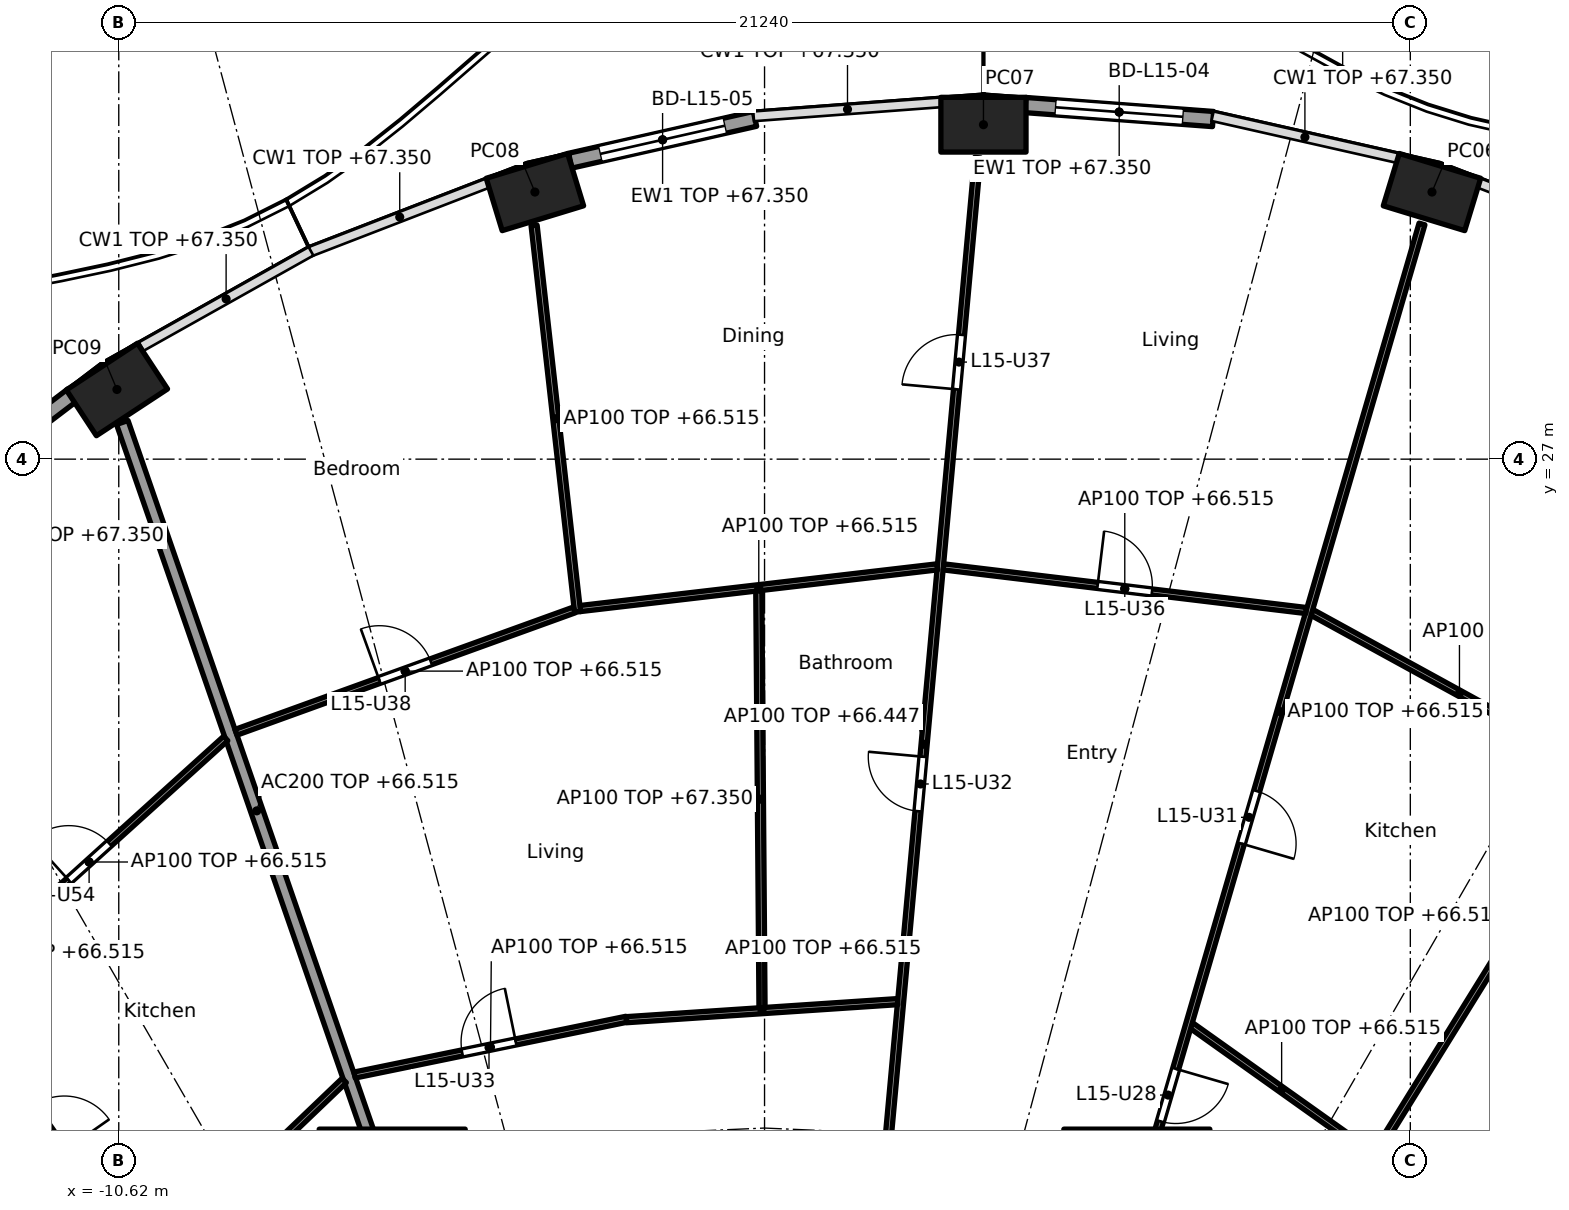
"""IFC4 building model, lengths in metres.
Left out: names, types, materials, properties, quantities, classifications, styles, units other than length and angle.
Written with IfcOpenShell. Run it as: python <this file> out.ifc"""

import sys

from ifc_helpers import new_model, si_unit, direction, frame, frame_2d, origin, origin_2d, place, context, subcontext, project, spatial, rectangle, hollow_rectangle, extrude, element, fill, save


model = new_model("IFC4")
c1 = context("Model", 3, precision=1e-05, world=origin(), true_north=direction((0.0, 1.0)))
c2 = subcontext(c1, "Body", "Model", "MODEL_VIEW")
j1 = project(units=[si_unit("LENGTHUNIT", "METRE"), si_unit("PLANEANGLEUNIT", "RADIAN")], contexts=[c1])
p1 = place(None, origin())
s1 = spatial("IfcSite", under=j1, at=p1, CompositionType="ELEMENT")
p2 = place(p1, origin())
s2 = spatial("IfcBuilding", under=s1, at=p2, CompositionType="ELEMENT")
p3 = place(p2, frame((0.0, 0.0, 64.0)))
s3 = spatial("IfcBuildingStorey", under=s2, at=p3, CompositionType="ELEMENT", Elevation=64.0)
for number, where, z_axis, x_axis in (
    (1, (10.976, 31.393, 0.0), (0.0, 0.0, 1.0), (-0.957, 0.292, 0.0)),
    (2, (3.6, 32.5, 0.0), (0.0, 0.0, 1.0), (-1.0, 0.0, 0.0)),
    (3, (-3.776, 31.393, 0.0), (0.0, 0.0, 1.0), (-0.957, -0.292, 0.0)),
    (4, (-10.65, 28.146, 0.0), (0.0, 0.0, 1.0), (-0.836, -0.549, 0.0)),
):
    element("IfcColumn", number, at=place(p3, frame(where, z_axis=z_axis, x_axis=x_axis)), inside=s3, PredefinedType="COLUMN", context=c2, shape_type="SweptSolid", body=[
        extrude(hollow_rectangle(XDim=1.4, YDim=0.9, WallThickness=0.05, at=origin_2d()), origin(), (0.0, 0.0, 1.0), 3.7),
    ])
for number, where, z_axis, x_axis in (
    (5, (6.123, 14.782, 0.0), (0.0, 0.0, 1.0), (1.0, 0.0, 0.0)),
    (6, (-6.123, 14.782, 0.0), (0.0, 0.0, 1.0), (1.0, 0.0, 0.0)),
):
    element("IfcColumn", number, at=place(p3, frame(where, z_axis=z_axis, x_axis=x_axis)), inside=s3, PredefinedType="COLUMN", context=c2, shape_type="SweptSolid", body=[
        extrude(rectangle(XDim=2.4, YDim=2.4, at=origin_2d()), origin(), (0.0, 0.0, 1.0), 3.7),
    ])
p4 = place(p3, frame((4.289, 32.823, 0.0), z_axis=(0.0, 0.0, 1.0), x_axis=(0.997230834878, -0.074368420505, 0.0)))
e7 = element("IfcWall", 7, at=p4, inside=s3, PredefinedType="SOLIDWALL", context=c2, shape_type="SweptSolid", body=[
    extrude(rectangle(XDim=3.096, YDim=0.25, at=frame_2d((1.548, 0.0))), origin(), (0.0, 0.0, 1.0), 3.35),
])
p5 = place(p4, frame((0.498, 0.0, 0.0)))
e8 = element("IfcOpeningElement", 8, at=p5, cuts=e7, PredefinedType="OPENING", context=c2, shape_type="SweptSolid", body=[
    extrude(rectangle(XDim=2.1, YDim=2.4, at=frame_2d((1.05, 1.2))), frame((0.0, 0.135, 0.0), z_axis=(0.0, -1.0, 0.0), x_axis=(1.0, 0.0, 0.0)), (0.0, 0.0, 1.0), 0.27),
])
p6 = place(p3, frame((-3.195, 31.908, 0.0), z_axis=(0.0, 0.0, 1.0), x_axis=(0.975331134677, 0.220746863466, 0.0)))
e9 = element("IfcWall", 9, at=p6, inside=s3, PredefinedType="SOLIDWALL", context=c2, shape_type="SweptSolid", body=[
    extrude(rectangle(XDim=3.115, YDim=0.25, at=frame_2d((1.557, 0.0))), origin(), (0.0, 0.0, 1.0), 3.35),
])
p7 = place(p6, frame((0.507, 0.0, 0.0)))
e10 = element("IfcOpeningElement", 10, at=p7, cuts=e9, PredefinedType="OPENING", context=c2, shape_type="SweptSolid", body=[
    extrude(rectangle(XDim=2.1, YDim=2.4, at=frame_2d((1.05, 1.2))), frame((0.0, 0.135, 0.0), z_axis=(0.0, -1.0, 0.0), x_axis=(1.0, 0.0, 0.0)), (0.0, 0.0, 1.0), 0.27),
])
p8 = place(p3, frame((-13.979, 26.081, 0.0), z_axis=(0.0, 0.0, 1.0), x_axis=(0.796022293214, 0.605267303517, 0.0)))
e11 = element("IfcWall", 11, at=p8, inside=s3, PredefinedType="SOLIDWALL", context=c2, shape_type="SweptSolid", body=[
    extrude(rectangle(XDim=3.262, YDim=0.25, at=frame_2d((1.631, 0.0))), origin(), (0.0, 0.0, 1.0), 3.35),
])
p9 = place(p8, frame((0.581, 0.0, 0.0)))
e12 = element("IfcOpeningElement", 12, at=p9, cuts=e11, PredefinedType="OPENING", context=c2, shape_type="SweptSolid", body=[
    extrude(rectangle(XDim=2.1, YDim=2.4, at=frame_2d((1.05, 1.2))), frame((0.0, 0.135, 0.0), z_axis=(0.0, -1.0, 0.0), x_axis=(1.0, 0.0, 0.0)), (0.0, 0.0, 1.0), 0.27),
])
p10 = place(p3, frame((-6.139, 14.829, 0.0), z_axis=(0.0, 0.0, 1.0), x_axis=(-0.327178799566, 0.944962450637, 0.0)))
e13 = element("IfcWall", 13, at=p10, inside=s3, PredefinedType="PARTITIONING", context=c2, shape_type="SweptSolid", body=[
    extrude(rectangle(XDim=13.517, YDim=0.2, at=frame_2d((6.759, 0.0))), origin(), (0.0, 0.0, 1.0), 2.515),
])
p11 = place(p3, frame((10.003, 15.503, 0.0), z_axis=(0.0, 0.0, 1.0), x_axis=(0.52645953022, 0.850200189979, 0.0)))
e14 = element("IfcWall", 14, at=p11, inside=s3, PredefinedType="PARTITIONING", context=c2, shape_type="SweptSolid", body=[
    extrude(rectangle(XDim=7.45, YDim=0.1, at=frame_2d((3.725, 0.0))), origin(), (0.0, 0.0, 1.0), 2.515),
])
p12 = place(p3, frame((9.989, 15.574, 0.0), z_axis=(0.0, 0.0, 1.0), x_axis=(-0.81494477814, 0.57953861699, 0.0)))
e15 = element("IfcWall", 15, at=p12, inside=s3, PredefinedType="PARTITIONING", context=c2, shape_type="SweptSolid", body=[
    extrude(rectangle(XDim=3.644, YDim=0.1, at=frame_2d((1.822, 0.0))), origin(), (0.0, 0.0, 1.0), 2.515),
])
p13 = place(p3, frame((13.855, 21.818, 0.0), z_axis=(0.0, 0.0, 1.0), x_axis=(-0.876794415294, 0.480865421203, 0.0)))
e16 = element("IfcWall", 16, at=p13, inside=s3, PredefinedType="PARTITIONING", context=c2, shape_type="SweptSolid", body=[
    extrude(rectangle(XDim=5.536, YDim=0.1, at=frame_2d((2.768, 0.0))), origin(), (0.0, 0.0, 1.0), 2.515),
])
p14 = place(p3, frame((6.137, 14.83, 0.0), z_axis=(0.0, 0.0, 1.0), x_axis=(0.27985745069, 0.960041565399, 0.0)))
e17 = element("IfcWall", 17, at=p14, inside=s3, PredefinedType="PARTITIONING", context=c2, shape_type="SweptSolid", body=[
    extrude(rectangle(XDim=16.705, YDim=0.1, at=frame_2d((8.353, 0.0))), origin(), (0.0, 0.0, 1.0), 2.515),
])
p15 = place(p14, frame((1.334, 0.0, 0.0)))
e18 = element("IfcOpeningElement", 18, at=p15, cuts=e17, PredefinedType="OPENING", context=c2, shape_type="SweptSolid", body=[
    extrude(rectangle(XDim=0.9, YDim=2.1, at=frame_2d((0.45, 1.05))), frame((0.0, 0.06, 0.0), z_axis=(0.0, -1.0, 0.0), x_axis=(1.0, 0.0, 0.0)), (0.0, 0.0, 1.0), 0.12),
])
p16 = place(p14, frame((6.091, 0.0, 0.0)))
e19 = element("IfcOpeningElement", 19, at=p16, cuts=e17, PredefinedType="OPENING", context=c2, shape_type="SweptSolid", body=[
    extrude(rectangle(XDim=0.9, YDim=2.1, at=frame_2d((0.45, 1.05))), frame((0.0, 0.06, 0.0), z_axis=(0.0, -1.0, 0.0), x_axis=(1.0, 0.0, 0.0)), (0.0, 0.0, 1.0), 0.12),
])
p17 = place(p3, frame((8.907, 24.51, 0.0), z_axis=(0.0, 0.0, 1.0), x_axis=(-0.992836798252, 0.119478416615, 0.0)))
e20 = element("IfcWall", 20, at=p17, inside=s3, PredefinedType="PARTITIONING", context=c2, shape_type="SweptSolid", body=[
    extrude(rectangle(XDim=6.01, YDim=0.1, at=frame_2d((3.005, 0.0))), origin(), (0.0, 0.0, 1.0), 2.515),
])
p18 = place(p17, frame((2.555, 0.0, 0.0)))
e21 = element("IfcOpeningElement", 21, at=p18, cuts=e20, PredefinedType="OPENING", context=c2, shape_type="SweptSolid", body=[
    extrude(rectangle(XDim=0.9, YDim=2.1, at=frame_2d((0.45, 1.05))), frame((0.0, 0.06, 0.0), z_axis=(0.0, -1.0, 0.0), x_axis=(1.0, 0.0, 0.0)), (0.0, 0.0, 1.0), 0.12),
])
p19 = place(p3, frame((1.744, 12.664, 0.0), z_axis=(0.0, 0.0, 1.0), x_axis=(0.090893639596, 0.995860605849, 0.0)))
e22 = element("IfcWall", 22, at=p19, inside=s3, PredefinedType="PARTITIONING", context=c2, shape_type="SweptSolid", body=[
    extrude(rectangle(XDim=19.374, YDim=0.1, at=frame_2d((9.687, 0.0))), origin(), (0.0, 0.0, 1.0), 2.447),
])
p20 = place(p19, frame((2.27, 0.0, 0.0)))
e23 = element("IfcOpeningElement", 23, at=p20, cuts=e22, PredefinedType="OPENING", context=c2, shape_type="SweptSolid", body=[
    extrude(rectangle(XDim=0.9, YDim=2.1, at=frame_2d((0.45, 1.05))), frame((0.0, 0.06, 0.0), z_axis=(0.0, -1.0, 0.0), x_axis=(1.0, 0.0, 0.0)), (0.0, 0.0, 1.0), 0.12),
])
p21 = place(p19, frame((8.582, 0.0, 0.0)))
e24 = element("IfcOpeningElement", 24, at=p21, cuts=e22, PredefinedType="OPENING", context=c2, shape_type="SweptSolid", body=[
    extrude(rectangle(XDim=0.9, YDim=2.1, at=frame_2d((0.45, 1.05))), frame((0.0, 0.06, 0.0), z_axis=(0.0, -1.0, 0.0), x_axis=(1.0, 0.0, 0.0)), (0.0, 0.0, 1.0), 0.12),
])
p22 = place(p19, frame((15.548, 0.0, 0.0)))
e25 = element("IfcOpeningElement", 25, at=p22, cuts=e22, PredefinedType="OPENING", context=c2, shape_type="SweptSolid", body=[
    extrude(rectangle(XDim=0.9, YDim=2.1, at=frame_2d((0.45, 1.05))), frame((0.0, 0.06, 0.0), z_axis=(0.0, -1.0, 0.0), x_axis=(1.0, 0.0, 0.0)), (0.0, 0.0, 1.0), 0.12),
])
p23 = place(p3, frame((2.188, 18.079, 0.0), z_axis=(0.0, 0.0, 1.0), x_axis=(-0.997791437766, -0.066424744789, 0.0)))
e26 = element("IfcWall", 26, at=p23, inside=s3, PredefinedType="PARTITIONING", context=c2, shape_type="SweptSolid", body=[
    extrude(rectangle(XDim=4.469, YDim=0.1, at=frame_2d((2.235, 0.0))), origin(), (0.0, 0.0, 1.0), 2.515),
])
p24 = place(p3, frame((2.842, 25.229, 0.0), z_axis=(0.0, 0.0, 1.0), x_axis=(-0.993255612046, -0.115945198862, 0.0)))
e27 = element("IfcWall", 27, at=p24, inside=s3, PredefinedType="PARTITIONING", context=c2, shape_type="SweptSolid", body=[
    extrude(rectangle(XDim=5.913, YDim=0.1, at=frame_2d((2.956, 0.0))), origin(), (0.0, 0.0, 1.0), 2.515),
])
p25 = place(p3, frame((-0.042, 17.98, 0.0), z_axis=(0.0, 0.0, 1.0), x_axis=(-0.007692080119, 0.999970415514, 0.0)))
e28 = element("IfcWall", 28, at=p25, inside=s3, PredefinedType="PARTITIONING", context=c2, shape_type="SweptSolid", body=[
    extrude(rectangle(XDim=6.856, YDim=0.1, at=frame_2d((3.428, 0.0))), origin(), (0.0, 0.0, 1.0), 3.35),
])
p26 = place(p3, frame((-2.272, 17.789, 0.0), z_axis=(0.0, 0.0, 1.0), x_axis=(-0.979595137747, -0.200981009307, 0.0)))
e29 = element("IfcWall", 29, at=p26, inside=s3, PredefinedType="PARTITIONING", context=c2, shape_type="SweptSolid", body=[
    extrude(rectangle(XDim=4.562, YDim=0.1, at=frame_2d((2.281, 0.0))), origin(), (0.0, 0.0, 1.0), 2.515),
])
p27 = place(p26, frame((1.856, 0.0, 0.0)))
e30 = element("IfcOpeningElement", 30, at=p27, cuts=e29, PredefinedType="OPENING", context=c2, shape_type="SweptSolid", body=[
    extrude(rectangle(XDim=0.9, YDim=2.1, at=frame_2d((0.45, 1.05))), frame((0.0, 0.06, 0.0), z_axis=(0.0, -1.0, 0.0), x_axis=(1.0, 0.0, 0.0)), (0.0, 0.0, 1.0), 0.12),
])
p28 = place(p3, frame((-3.075, 24.488, 0.0), z_axis=(0.0, 0.0, 1.0), x_axis=(-0.111705235978, 0.993741384997, 0.0)))
e31 = element("IfcWall", 31, at=p28, inside=s3, PredefinedType="PARTITIONING", context=c2, shape_type="SweptSolid", body=[
    extrude(rectangle(XDim=6.395, YDim=0.1, at=frame_2d((3.198, 0.0))), origin(), (0.0, 0.0, 1.0), 2.515),
])
p29 = place(p3, frame((-3.128, 24.521, 0.0), z_axis=(0.0, 0.0, 1.0), x_axis=(-0.940401494588, -0.340066212636, 0.0)))
e32 = element("IfcWall", 32, at=p29, inside=s3, PredefinedType="PARTITIONING", context=c2, shape_type="SweptSolid", body=[
    extrude(rectangle(XDim=5.917, YDim=0.1, at=frame_2d((2.958, 0.0))), origin(), (0.0, 0.0, 1.0), 2.515),
])
p30 = place(p29, frame((2.509, 0.0, 0.0)))
e33 = element("IfcOpeningElement", 33, at=p30, cuts=e32, PredefinedType="OPENING", context=c2, shape_type="SweptSolid", body=[
    extrude(rectangle(XDim=0.9, YDim=2.1, at=frame_2d((0.45, 1.05))), frame((0.0, 0.06, 0.0), z_axis=(0.0, -1.0, 0.0), x_axis=(1.0, 0.0, 0.0)), (0.0, 0.0, 1.0), 0.12),
])
p31 = place(p3, frame((-6.912, 16.782, 0.0), z_axis=(0.0, 0.0, 1.0), x_axis=(-0.722775679202, -0.691082713975, 0.0)))
e34 = element("IfcWall", 34, at=p31, inside=s3, PredefinedType="PARTITIONING", context=c2, shape_type="SweptSolid", body=[
    extrude(rectangle(XDim=4.437, YDim=0.1, at=frame_2d((2.219, 0.0))), origin(), (0.0, 0.0, 1.0), 2.515),
])
p32 = place(p3, frame((-8.861, 22.407, 0.0), z_axis=(0.0, 0.0, 1.0), x_axis=(-0.741713303551, -0.670717060567, 0.0)))
e35 = element("IfcWall", 35, at=p32, inside=s3, PredefinedType="PARTITIONING", context=c2, shape_type="SweptSolid", body=[
    extrude(rectangle(XDim=6.059, YDim=0.1, at=frame_2d((3.03, 0.0))), origin(), (0.0, 0.0, 1.0), 2.515),
])
p33 = place(p32, frame((2.58, 0.0, 0.0)))
e36 = element("IfcOpeningElement", 36, at=p33, cuts=e35, PredefinedType="OPENING", context=c2, shape_type="SweptSolid", body=[
    extrude(rectangle(XDim=0.9, YDim=2.1, at=frame_2d((0.45, 1.05))), frame((0.0, 0.06, 0.0), z_axis=(0.0, -1.0, 0.0), x_axis=(1.0, 0.0, 0.0)), (0.0, 0.0, 1.0), 0.12),
])
p34 = place(p3, frame((-10.126, 13.641, 0.0), z_axis=(0.0, 0.0, 1.0), x_axis=(-0.57313289907, 0.819462433552, 0.0)))
e37 = element("IfcWall", 37, at=p34, inside=s3, PredefinedType="PARTITIONING", context=c2, shape_type="SweptSolid", body=[
    extrude(rectangle(XDim=10.794, YDim=0.1, at=frame_2d((5.397, 0.0))), origin(), (0.0, 0.0, 1.0), 2.515),
])
p35 = place(p34, frame((2.424, 0.0, 0.0)))
e38 = element("IfcOpeningElement", 38, at=p35, cuts=e37, PredefinedType="OPENING", context=c2, shape_type="SweptSolid", body=[
    extrude(rectangle(XDim=0.9, YDim=2.1, at=frame_2d((0.45, 1.05))), frame((0.0, 0.06, 0.0), z_axis=(0.0, -1.0, 0.0), x_axis=(1.0, 0.0, 0.0)), (0.0, 0.0, 1.0), 0.12),
])
p36 = place(p5, origin())
e39 = element("IfcDoor", 39, at=p36, inside=s3, OperationType="SLIDING_TO_LEFT", PredefinedType="DOOR", context=c2, shape_type="SweptSolid", body=[
    extrude(rectangle(XDim=2.1, YDim=2.4, at=frame_2d((1.05, 1.2))), frame((0.0, 0.025, 0.0), z_axis=(0.0, -1.0, 0.0), x_axis=(1.0, 0.0, 0.0)), (0.0, 0.0, 1.0), 0.05),
])
fill(e8, e39)
p37 = place(p7, origin())
e40 = element("IfcDoor", 40, at=p37, inside=s3, OperationType="SLIDING_TO_LEFT", PredefinedType="DOOR", context=c2, shape_type="SweptSolid", body=[
    extrude(rectangle(XDim=2.1, YDim=2.4, at=frame_2d((1.05, 1.2))), frame((0.0, 0.025, 0.0), z_axis=(0.0, -1.0, 0.0), x_axis=(1.0, 0.0, 0.0)), (0.0, 0.0, 1.0), 0.05),
])
fill(e10, e40)
p38 = place(p15, frame((0.9, 0.0, 0.0), x_axis=(-1.0, 0.0, 0.0)))
e41 = element("IfcDoor", 41, at=p38, inside=s3, OperationType="SINGLE_SWING_LEFT", PredefinedType="DOOR", context=c2, shape_type="SweptSolid", body=[
    extrude(rectangle(XDim=0.9, YDim=2.1, at=frame_2d((0.45, 1.05))), frame((0.0, 0.025, 0.0), z_axis=(0.0, -1.0, 0.0), x_axis=(1.0, 0.0, 0.0)), (0.0, 0.0, 1.0), 0.05),
])
fill(e18, e41)
p39 = place(p16, frame((0.9, 0.0, 0.0), x_axis=(-1.0, 0.0, 0.0)))
e42 = element("IfcDoor", 42, at=p39, inside=s3, OperationType="SINGLE_SWING_RIGHT", PredefinedType="DOOR", context=c2, shape_type="SweptSolid", body=[
    extrude(rectangle(XDim=0.9, YDim=2.1, at=frame_2d((0.45, 1.05))), frame((0.0, 0.025, 0.0), z_axis=(0.0, -1.0, 0.0), x_axis=(1.0, 0.0, 0.0)), (0.0, 0.0, 1.0), 0.05),
])
fill(e19, e42)
p40 = place(p21, origin())
e43 = element("IfcDoor", 43, at=p40, inside=s3, OperationType="SINGLE_SWING_RIGHT", PredefinedType="DOOR", context=c2, shape_type="SweptSolid", body=[
    extrude(rectangle(XDim=0.9, YDim=2.1, at=frame_2d((0.45, 1.05))), frame((0.0, 0.025, 0.0), z_axis=(0.0, -1.0, 0.0), x_axis=(1.0, 0.0, 0.0)), (0.0, 0.0, 1.0), 0.05),
])
fill(e24, e43)
p41 = place(p27, frame((0.9, 0.0, 0.0), x_axis=(-1.0, 0.0, 0.0)))
e44 = element("IfcDoor", 44, at=p41, inside=s3, OperationType="SINGLE_SWING_RIGHT", PredefinedType="DOOR", context=c2, shape_type="SweptSolid", body=[
    extrude(rectangle(XDim=0.9, YDim=2.1, at=frame_2d((0.45, 1.05))), frame((0.0, 0.025, 0.0), z_axis=(0.0, -1.0, 0.0), x_axis=(1.0, 0.0, 0.0)), (0.0, 0.0, 1.0), 0.05),
])
fill(e30, e44)
p42 = place(p18, frame((0.9, 0.0, 0.0), x_axis=(-1.0, 0.0, 0.0)))
e45 = element("IfcDoor", 45, at=p42, inside=s3, OperationType="SINGLE_SWING_LEFT", PredefinedType="DOOR", context=c2, shape_type="SweptSolid", body=[
    extrude(rectangle(XDim=0.9, YDim=2.1, at=frame_2d((0.45, 1.05))), frame((0.0, 0.025, 0.0), z_axis=(0.0, -1.0, 0.0), x_axis=(1.0, 0.0, 0.0)), (0.0, 0.0, 1.0), 0.05),
])
fill(e21, e45)
p43 = place(p22, origin())
e46 = element("IfcDoor", 46, at=p43, inside=s3, OperationType="SINGLE_SWING_LEFT", PredefinedType="DOOR", context=c2, shape_type="SweptSolid", body=[
    extrude(rectangle(XDim=0.9, YDim=2.1, at=frame_2d((0.45, 1.05))), frame((0.0, 0.025, 0.0), z_axis=(0.0, -1.0, 0.0), x_axis=(1.0, 0.0, 0.0)), (0.0, 0.0, 1.0), 0.05),
])
fill(e25, e46)
p44 = place(p30, frame((0.9, 0.0, 0.0), x_axis=(-1.0, 0.0, 0.0)))
e47 = element("IfcDoor", 47, at=p44, inside=s3, OperationType="SINGLE_SWING_LEFT", PredefinedType="DOOR", context=c2, shape_type="SweptSolid", body=[
    extrude(rectangle(XDim=0.9, YDim=2.1, at=frame_2d((0.45, 1.05))), frame((0.0, 0.025, 0.0), z_axis=(0.0, -1.0, 0.0), x_axis=(1.0, 0.0, 0.0)), (0.0, 0.0, 1.0), 0.05),
])
fill(e33, e47)
p45 = place(p35, frame((0.9, 0.0, 0.0), x_axis=(-1.0, 0.0, 0.0)))
e48 = element("IfcDoor", 48, at=p45, inside=s3, OperationType="SINGLE_SWING_RIGHT", PredefinedType="DOOR", context=c2, shape_type="SweptSolid", body=[
    extrude(rectangle(XDim=0.9, YDim=2.1, at=frame_2d((0.45, 1.05))), frame((0.0, 0.025, 0.0), z_axis=(0.0, -1.0, 0.0), x_axis=(1.0, 0.0, 0.0)), (0.0, 0.0, 1.0), 0.05),
])
fill(e38, e48)
p46 = place(p33, frame((0.9, 0.0, 0.0), x_axis=(-1.0, 0.0, 0.0)))
e49 = element("IfcDoor", 49, at=p46, inside=s3, OperationType="SINGLE_SWING_LEFT", PredefinedType="DOOR", context=c2, shape_type="SweptSolid", body=[
    extrude(rectangle(XDim=0.9, YDim=2.1, at=frame_2d((0.45, 1.05))), frame((0.0, 0.025, 0.0), z_axis=(0.0, -1.0, 0.0), x_axis=(1.0, 0.0, 0.0)), (0.0, 0.0, 1.0), 0.05),
])
fill(e36, e49)
save(model, sys.argv[1])
